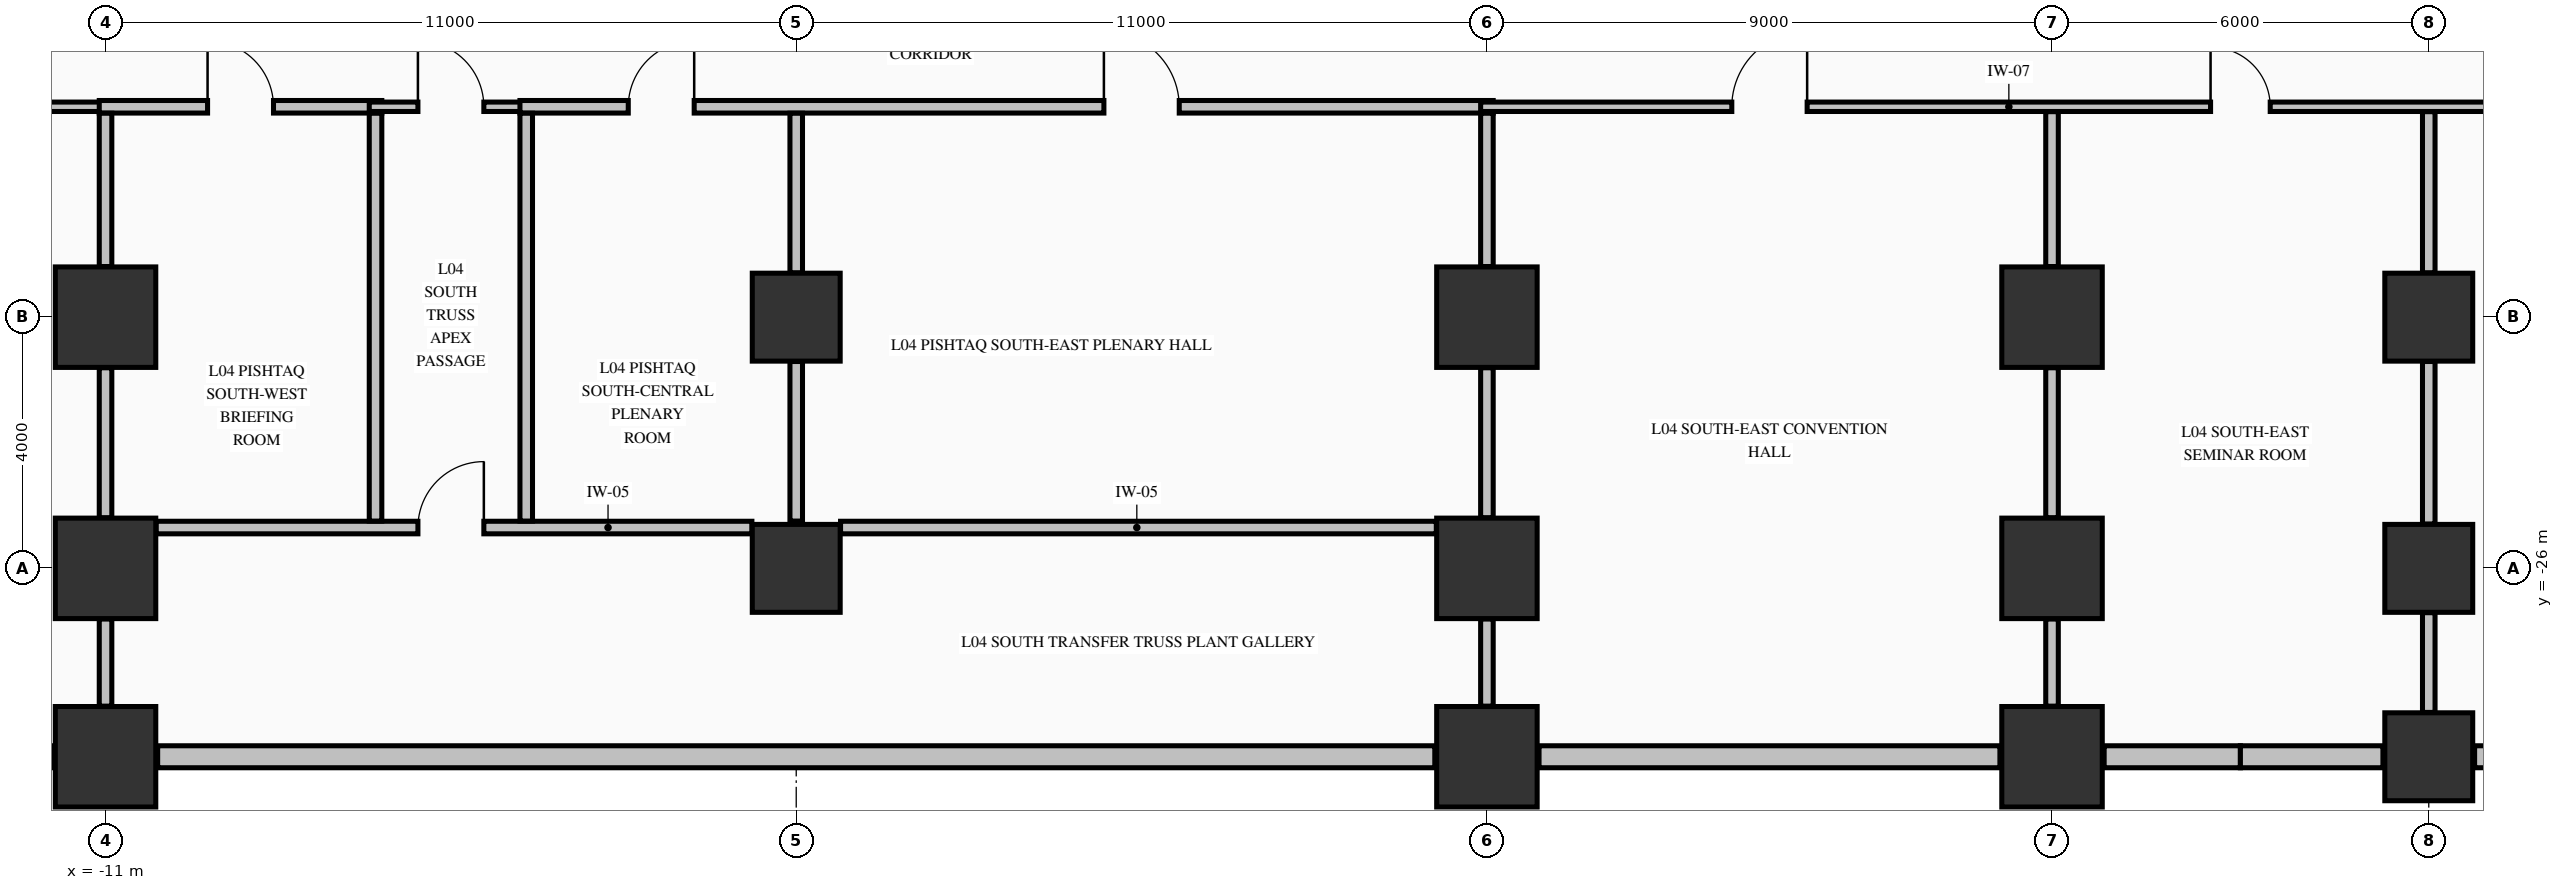
"""IFC4 building model, lengths in metres.
Left out: names, types, materials, properties, quantities, classifications, styles, units other than length and angle.
Written with IfcOpenShell. Run it as: python <this file> out.ifc"""

import sys

from ifc_helpers import new_model, si_unit, direction, frame, frame_2d, origin, origin_2d, place, context, subcontext, project, spatial, rectangle, extrude, element, fill, save


model = new_model("IFC4")
c1 = context("Model", 3, precision=1e-05, world=origin(), true_north=direction((0.0, 1.0)))
c2 = subcontext(c1, "Body", "Model", "MODEL_VIEW")
j1 = project(units=[si_unit("LENGTHUNIT", "METRE"), si_unit("PLANEANGLEUNIT", "RADIAN")], contexts=[c1])
p1 = place(None, origin())
s1 = spatial("IfcSite", under=j1, at=p1, CompositionType="ELEMENT")
p2 = place(p1, origin())
s2 = spatial("IfcBuilding", under=s1, at=p2, CompositionType="ELEMENT")
p3 = place(p2, frame((0.0, 0.0, 21.76)))
s3 = spatial("IfcBuildingStorey", under=s2, at=p3, CompositionType="ELEMENT", Elevation=21.76)
for number, where, z_axis, x_axis in (
    (1, (-11.0, -29.0, -0.45), (0.0, 0.0, 1.0), (1.0, 0.0, 0.0)),
    (2, (-11.0, -26.0, -0.45), (0.0, 0.0, 1.0), (1.0, 0.0, 0.0)),
    (3, (-11.0, -22.0, -0.45), (0.0, 0.0, 1.0), (1.0, 0.0, 0.0)),
):
    element("IfcColumn", number, at=place(p3, frame(where, z_axis=z_axis, x_axis=x_axis)), inside=s3, PredefinedType="COLUMN", context=c2, shape_type="SweptSolid", body=[
        extrude(rectangle(XDim=1.6, YDim=1.6, at=origin_2d()), origin(), (0.0, 0.0, 1.0), 5.44),
    ])
for number, where, z_axis, x_axis in (
    (4, (0.0, -26.0, -0.45), (0.0, 0.0, 1.0), (1.0, 0.0, 0.0)),
    (5, (0.0, -22.0, -0.45), (0.0, 0.0, 1.0), (1.0, 0.0, 0.0)),
):
    element("IfcColumn", number, at=place(p3, frame(where, z_axis=z_axis, x_axis=x_axis)), inside=s3, PredefinedType="COLUMN", context=c2, shape_type="SweptSolid", body=[
        extrude(rectangle(XDim=1.4, YDim=1.4, at=origin_2d()), origin(), (0.0, 0.0, 1.0), 5.44),
    ])
for number, where, z_axis, x_axis in (
    (6, (11.0, -29.0, -0.45), (0.0, 0.0, 1.0), (1.0, 0.0, 0.0)),
    (7, (11.0, -26.0, -0.45), (0.0, 0.0, 1.0), (1.0, 0.0, 0.0)),
    (8, (11.0, -22.0, -0.45), (0.0, 0.0, 1.0), (1.0, 0.0, 0.0)),
    (9, (20.0, -29.0, -0.45), (0.0, 0.0, 1.0), (1.0, 0.0, 0.0)),
    (10, (20.0, -26.0, -0.45), (0.0, 0.0, 1.0), (1.0, 0.0, 0.0)),
    (11, (20.0, -22.0, -0.45), (0.0, 0.0, 1.0), (1.0, 0.0, 0.0)),
):
    element("IfcColumn", number, at=place(p3, frame(where, z_axis=z_axis, x_axis=x_axis)), inside=s3, PredefinedType="COLUMN", context=c2, shape_type="SweptSolid", body=[
        extrude(rectangle(XDim=1.6, YDim=1.6, at=origin_2d()), origin(), (0.0, 0.0, 1.0), 5.44),
    ])
for number, where, z_axis, x_axis in (
    (12, (26.0, -29.0, -0.45), (0.0, 0.0, 1.0), (1.0, 0.0, 0.0)),
    (13, (26.0, -26.0, -0.45), (0.0, 0.0, 1.0), (1.0, 0.0, 0.0)),
    (14, (26.0, -22.0, -0.45), (0.0, 0.0, 1.0), (1.0, 0.0, 0.0)),
):
    element("IfcColumn", number, at=place(p3, frame(where, z_axis=z_axis, x_axis=x_axis)), inside=s3, PredefinedType="COLUMN", context=c2, shape_type="SweptSolid", body=[
        extrude(rectangle(XDim=1.4, YDim=1.4, at=origin_2d()), origin(), (0.0, 0.0, 1.0), 5.44),
    ])
p4 = place(p3, frame((-19.17, -29.0, 0.0), z_axis=(0.0, 0.0, 1.0), x_axis=(1.0, 0.0, 0.0)))
e15 = element("IfcWall", 15, at=p4, inside=s3, PredefinedType="STANDARD", context=c2, shape_type="SweptSolid", body=[
    extrude(rectangle(XDim=7.34, YDim=0.35, at=frame_2d((3.67, 0.0))), origin(), (0.0, 0.0, 1.0), 3.332),
])
p5 = place(p3, frame((-10.17, -29.0, 0.0), z_axis=(0.0, 0.0, 1.0), x_axis=(1.0, 0.0, 0.0)))
e16 = element("IfcWall", 16, at=p5, inside=s3, PredefinedType="STANDARD", context=c2, shape_type="SweptSolid", body=[
    extrude(rectangle(XDim=20.34, YDim=0.35, at=frame_2d((10.17, 0.0))), origin(), (0.0, 0.0, 1.0), 2.582),
])
p6 = place(p3, frame((11.83, -29.0, 0.0), z_axis=(0.0, 0.0, 1.0), x_axis=(1.0, 0.0, 0.0)))
e17 = element("IfcWall", 17, at=p6, inside=s3, PredefinedType="STANDARD", context=c2, shape_type="SweptSolid", body=[
    extrude(rectangle(XDim=7.34, YDim=0.35, at=frame_2d((3.67, 0.0))), origin(), (0.0, 0.0, 1.0), 3.332),
])
p7 = place(p3, frame((20.83, -29.0, 0.0), z_axis=(0.0, 0.0, 1.0), x_axis=(1.0, 0.0, 0.0)))
e18 = element("IfcWall", 18, at=p7, inside=s3, PredefinedType="STANDARD", context=c2, shape_type="SweptSolid", body=[
    extrude(rectangle(XDim=2.17, YDim=0.35, at=frame_2d((1.085, 0.0))), origin(), (0.0, 0.0, 1.0), 3.332),
])
p8 = place(p3, frame((23.0, -29.0, 0.0), z_axis=(0.0, 0.0, 1.0), x_axis=(1.0, 0.0, 0.0)))
e19 = element("IfcWall", 19, at=p8, inside=s3, PredefinedType="STANDARD", context=c2, shape_type="SweptSolid", body=[
    extrude(rectangle(XDim=2.27, YDim=0.35, at=frame_2d((1.135, 0.0))), origin(), (0.0, 0.0, 1.0), 3.332),
])
p9 = place(p3, frame((26.73, -29.0, 0.0), z_axis=(0.0, 0.0, 1.0), x_axis=(1.0, 0.0, 0.0)))
e20 = element("IfcWall", 20, at=p9, inside=s3, PredefinedType="STANDARD", context=c2, shape_type="SweptSolid", body=[
    extrude(rectangle(XDim=2.54, YDim=0.35, at=frame_2d((1.27, 0.0))), origin(), (0.0, 0.0, 1.0), 3.332),
])
p10 = place(p3, frame((-10.194, -25.35, 0.0), z_axis=(0.0, 0.0, 1.0), x_axis=(1.0, 0.0, 0.0)))
e21 = element("IfcWall", 21, at=p10, inside=s3, PredefinedType="PARTITIONING", context=c2, shape_type="SweptSolid", body=[
    extrude(rectangle(XDim=9.488, YDim=0.2, at=frame_2d((4.744, 0.0))), origin(), (0.0, 0.0, 1.0), 3.332),
])
p11 = place(p10, frame((4.169, 0.0, 0.0)))
e22 = element("IfcOpeningElement", 22, at=p11, cuts=e21, PredefinedType="OPENING", context=c2, shape_type="SweptSolid", body=[
    extrude(rectangle(XDim=1.05, YDim=2.15, at=frame_2d((0.525, 1.075))), frame((0.0, 0.11, 0.0), z_axis=(0.0, -1.0, 0.0), x_axis=(1.0, 0.0, 0.0)), (0.0, 0.0, 1.0), 0.22),
])
p12 = place(p3, frame((0.706, -25.35, 0.0), z_axis=(0.0, 0.0, 1.0), x_axis=(1.0, 0.0, 0.0)))
e23 = element("IfcWall", 23, at=p12, inside=s3, PredefinedType="PARTITIONING", context=c2, shape_type="SweptSolid", body=[
    extrude(rectangle(XDim=9.488, YDim=0.2, at=frame_2d((4.744, 0.0))), origin(), (0.0, 0.0, 1.0), 3.332),
])
p13 = place(p3, frame((-29.85, -18.65, 0.0), z_axis=(0.0, 0.0, 1.0), x_axis=(1.0, 0.0, 0.0)))
e24 = element("IfcWall", 24, at=p13, inside=s3, PredefinedType="PARTITIONING", context=c2, shape_type="SweptSolid", body=[
    extrude(rectangle(XDim=18.95, YDim=0.15, at=frame_2d((9.475, 0.0))), origin(), (0.0, 0.0, 1.0), 4.99),
])
p14 = place(p13, frame((1.425, 0.0, 0.0)))
e25 = element("IfcOpeningElement", 25, at=p14, cuts=e24, PredefinedType="OPENING", context=c2, shape_type="SweptSolid", body=[
    extrude(rectangle(XDim=0.95, YDim=2.15, at=frame_2d((0.475, 1.075))), frame((0.0, 0.085, 0.0), z_axis=(0.0, -1.0, 0.0), x_axis=(1.0, 0.0, 0.0)), (0.0, 0.0, 1.0), 0.17),
])
p15 = place(p13, frame((6.375, 0.0, 0.0)))
e26 = element("IfcOpeningElement", 26, at=p15, cuts=e24, PredefinedType="OPENING", context=c2, shape_type="SweptSolid", body=[
    extrude(rectangle(XDim=0.95, YDim=2.15, at=frame_2d((0.475, 1.075))), frame((0.0, 0.085, 0.0), z_axis=(0.0, -1.0, 0.0), x_axis=(1.0, 0.0, 0.0)), (0.0, 0.0, 1.0), 0.17),
])
p16 = place(p13, frame((13.75, 0.0, 0.0)))
e27 = element("IfcOpeningElement", 27, at=p16, cuts=e24, PredefinedType="OPENING", context=c2, shape_type="SweptSolid", body=[
    extrude(rectangle(XDim=1.2, YDim=2.15, at=frame_2d((0.6, 1.075))), frame((0.0, 0.085, 0.0), z_axis=(0.0, -1.0, 0.0), x_axis=(1.0, 0.0, 0.0)), (0.0, 0.0, 1.0), 0.17),
])
p17 = place(p3, frame((-11.1, -18.65, 0.0), z_axis=(0.0, 0.0, 1.0), x_axis=(1.0, 0.0, 0.0)))
e28 = element("IfcWall", 28, at=p17, inside=s3, PredefinedType="PARTITIONING", context=c2, shape_type="SweptSolid", body=[
    extrude(rectangle(XDim=4.5, YDim=0.2, at=frame_2d((2.25, 0.0))), origin(), (0.0, 0.0, 1.0), 4.99),
])
p18 = place(p17, frame((1.725, 0.0, 0.0)))
e29 = element("IfcOpeningElement", 29, at=p18, cuts=e28, PredefinedType="OPENING", context=c2, shape_type="SweptSolid", body=[
    extrude(rectangle(XDim=1.05, YDim=2.15, at=frame_2d((0.525, 1.075))), frame((0.0, 0.11, 0.0), z_axis=(0.0, -1.0, 0.0), x_axis=(1.0, 0.0, 0.0)), (0.0, 0.0, 1.0), 0.22),
])
p19 = place(p3, frame((-6.8, -18.65, 0.0), z_axis=(0.0, 0.0, 1.0), x_axis=(1.0, 0.0, 0.0)))
e30 = element("IfcWall", 30, at=p19, inside=s3, PredefinedType="PARTITIONING", context=c2, shape_type="SweptSolid", body=[
    extrude(rectangle(XDim=2.6, YDim=0.15, at=frame_2d((1.3, 0.0))), origin(), (0.0, 0.0, 1.0), 4.99),
])
p20 = place(p19, frame((0.775, 0.0, 0.0)))
e31 = element("IfcOpeningElement", 31, at=p20, cuts=e30, PredefinedType="OPENING", context=c2, shape_type="SweptSolid", body=[
    extrude(rectangle(XDim=1.05, YDim=2.15, at=frame_2d((0.525, 1.075))), frame((0.0, 0.085, 0.0), z_axis=(0.0, -1.0, 0.0), x_axis=(1.0, 0.0, 0.0)), (0.0, 0.0, 1.0), 0.17),
])
p21 = place(p3, frame((-4.4, -18.65, 0.0), z_axis=(0.0, 0.0, 1.0), x_axis=(1.0, 0.0, 0.0)))
e32 = element("IfcWall", 32, at=p21, inside=s3, PredefinedType="PARTITIONING", context=c2, shape_type="SweptSolid", body=[
    extrude(rectangle(XDim=15.5, YDim=0.2, at=frame_2d((7.75, 0.0))), origin(), (0.0, 0.0, 1.0), 4.99),
])
p22 = place(p21, frame((1.725, 0.0, 0.0)))
e33 = element("IfcOpeningElement", 33, at=p22, cuts=e32, PredefinedType="OPENING", context=c2, shape_type="SweptSolid", body=[
    extrude(rectangle(XDim=1.05, YDim=2.15, at=frame_2d((0.525, 1.075))), frame((0.0, 0.11, 0.0), z_axis=(0.0, -1.0, 0.0), x_axis=(1.0, 0.0, 0.0)), (0.0, 0.0, 1.0), 0.22),
])
p23 = place(p21, frame((9.3, 0.0, 0.0)))
e34 = element("IfcOpeningElement", 34, at=p23, cuts=e32, PredefinedType="OPENING", context=c2, shape_type="SweptSolid", body=[
    extrude(rectangle(XDim=1.2, YDim=2.15, at=frame_2d((0.6, 1.075))), frame((0.0, 0.11, 0.0), z_axis=(0.0, -1.0, 0.0), x_axis=(1.0, 0.0, 0.0)), (0.0, 0.0, 1.0), 0.22),
])
p24 = place(p3, frame((10.9, -18.65, 0.0), z_axis=(0.0, 0.0, 1.0), x_axis=(1.0, 0.0, 0.0)))
e35 = element("IfcWall", 35, at=p24, inside=s3, PredefinedType="PARTITIONING", context=c2, shape_type="SweptSolid", body=[
    extrude(rectangle(XDim=18.95, YDim=0.15, at=frame_2d((9.475, 0.0))), origin(), (0.0, 0.0, 1.0), 4.99),
])
p25 = place(p24, frame((4.0, 0.0, 0.0)))
e36 = element("IfcOpeningElement", 36, at=p25, cuts=e35, PredefinedType="OPENING", context=c2, shape_type="SweptSolid", body=[
    extrude(rectangle(XDim=1.2, YDim=2.15, at=frame_2d((0.6, 1.075))), frame((0.0, 0.085, 0.0), z_axis=(0.0, -1.0, 0.0), x_axis=(1.0, 0.0, 0.0)), (0.0, 0.0, 1.0), 0.17),
])
p26 = place(p24, frame((11.625, 0.0, 0.0)))
e37 = element("IfcOpeningElement", 37, at=p26, cuts=e35, PredefinedType="OPENING", context=c2, shape_type="SweptSolid", body=[
    extrude(rectangle(XDim=0.95, YDim=2.15, at=frame_2d((0.475, 1.075))), frame((0.0, 0.085, 0.0), z_axis=(0.0, -1.0, 0.0), x_axis=(1.0, 0.0, 0.0)), (0.0, 0.0, 1.0), 0.17),
])
p27 = place(p24, frame((16.555, 0.0, 0.0)))
e38 = element("IfcOpeningElement", 38, at=p27, cuts=e35, PredefinedType="OPENING", context=c2, shape_type="SweptSolid", body=[
    extrude(rectangle(XDim=0.95, YDim=2.15, at=frame_2d((0.475, 1.075))), frame((0.0, 0.085, 0.0), z_axis=(0.0, -1.0, 0.0), x_axis=(1.0, 0.0, 0.0)), (0.0, 0.0, 1.0), 0.17),
])
p28 = place(p3, frame((-11.0, -28.194, 0.0), z_axis=(0.0, 0.0, 1.0), x_axis=(0.0, 1.0, 0.0)))
e39 = element("IfcWall", 39, at=p28, inside=s3, PredefinedType="PARTITIONING", context=c2, shape_type="SweptSolid", body=[
    extrude(rectangle(XDim=1.388, YDim=0.2, at=frame_2d((0.694, 0.0))), origin(), (0.0, 0.0, 1.0), 3.332),
])
p29 = place(p3, frame((-11.0, -25.194, 0.0), z_axis=(0.0, 0.0, 1.0), x_axis=(0.0, 1.0, 0.0)))
e40 = element("IfcWall", 40, at=p29, inside=s3, PredefinedType="PARTITIONING", context=c2, shape_type="SweptSolid", body=[
    extrude(rectangle(XDim=2.388, YDim=0.2, at=frame_2d((1.194, 0.0))), origin(), (0.0, 0.0, 1.0), 3.332),
])
p30 = place(p3, frame((-11.0, -21.194, 0.0), z_axis=(0.0, 0.0, 1.0), x_axis=(0.0, 1.0, 0.0)))
e41 = element("IfcWall", 41, at=p30, inside=s3, PredefinedType="PARTITIONING", context=c2, shape_type="SweptSolid", body=[
    extrude(rectangle(XDim=2.441, YDim=0.2, at=frame_2d((1.221, 0.0))), origin(), (0.0, 0.0, 1.0), 3.332),
])
for number, where, z_axis, x_axis in (
    (42, (-6.7, -25.247, 0.0), (0.0, 0.0, 1.0), (0.0, 1.0, 0.0)),
    (43, (-4.3, -25.247, 0.0), (0.0, 0.0, 1.0), (0.0, 1.0, 0.0)),
):
    element("IfcWall", number, at=place(p3, frame(where, z_axis=z_axis, x_axis=x_axis)), inside=s3, PredefinedType="PARTITIONING", context=c2, shape_type="SweptSolid", body=[
        extrude(rectangle(XDim=6.494, YDim=0.2, at=frame_2d((3.247, 0.0))), origin(), (0.0, 0.0, 1.0), 4.99),
    ])
for number, where, z_axis, x_axis in (
    (44, (0.0, -25.247, 0.0), (0.0, 0.0, 1.0), (0.0, 1.0, 0.0)),
    (45, (0.0, -21.294, 0.0), (0.0, 0.0, 1.0), (0.0, 1.0, 0.0)),
):
    element("IfcWall", number, at=place(p3, frame(where, z_axis=z_axis, x_axis=x_axis)), inside=s3, PredefinedType="PARTITIONING", context=c2, shape_type="SweptSolid", body=[
        extrude(rectangle(XDim=2.541, YDim=0.2, at=frame_2d((1.271, 0.0))), origin(), (0.0, 0.0, 1.0), 3.332),
    ])
p31 = place(p3, frame((11.0, -28.194, 0.0), z_axis=(0.0, 0.0, 1.0), x_axis=(0.0, 1.0, 0.0)))
e46 = element("IfcWall", 46, at=p31, inside=s3, PredefinedType="PARTITIONING", context=c2, shape_type="SweptSolid", body=[
    extrude(rectangle(XDim=1.388, YDim=0.2, at=frame_2d((0.694, 0.0))), origin(), (0.0, 0.0, 1.0), 3.332),
])
p32 = place(p3, frame((11.0, -25.194, 0.0), z_axis=(0.0, 0.0, 1.0), x_axis=(0.0, 1.0, 0.0)))
e47 = element("IfcWall", 47, at=p32, inside=s3, PredefinedType="PARTITIONING", context=c2, shape_type="SweptSolid", body=[
    extrude(rectangle(XDim=2.388, YDim=0.2, at=frame_2d((1.194, 0.0))), origin(), (0.0, 0.0, 1.0), 3.332),
])
p33 = place(p3, frame((11.0, -21.194, 0.0), z_axis=(0.0, 0.0, 1.0), x_axis=(0.0, 1.0, 0.0)))
e48 = element("IfcWall", 48, at=p33, inside=s3, PredefinedType="PARTITIONING", context=c2, shape_type="SweptSolid", body=[
    extrude(rectangle(XDim=2.441, YDim=0.2, at=frame_2d((1.221, 0.0))), origin(), (0.0, 0.0, 1.0), 3.332),
])
p34 = place(p3, frame((20.0, -28.194, 0.0), z_axis=(0.0, 0.0, 1.0), x_axis=(0.0, 1.0, 0.0)))
e49 = element("IfcWall", 49, at=p34, inside=s3, PredefinedType="PARTITIONING", context=c2, shape_type="SweptSolid", body=[
    extrude(rectangle(XDim=1.388, YDim=0.2, at=frame_2d((0.694, 0.0))), origin(), (0.0, 0.0, 1.0), 3.332),
])
p35 = place(p3, frame((20.0, -25.194, 0.0), z_axis=(0.0, 0.0, 1.0), x_axis=(0.0, 1.0, 0.0)))
e50 = element("IfcWall", 50, at=p35, inside=s3, PredefinedType="PARTITIONING", context=c2, shape_type="SweptSolid", body=[
    extrude(rectangle(XDim=2.388, YDim=0.2, at=frame_2d((1.194, 0.0))), origin(), (0.0, 0.0, 1.0), 3.332),
])
p36 = place(p3, frame((20.0, -21.194, 0.0), z_axis=(0.0, 0.0, 1.0), x_axis=(0.0, 1.0, 0.0)))
e51 = element("IfcWall", 51, at=p36, inside=s3, PredefinedType="PARTITIONING", context=c2, shape_type="SweptSolid", body=[
    extrude(rectangle(XDim=2.466, YDim=0.2, at=frame_2d((1.233, 0.0))), origin(), (0.0, 0.0, 1.0), 3.332),
])
p37 = place(p3, frame((26.0, -28.294, 0.0), z_axis=(0.0, 0.0, 1.0), x_axis=(0.0, 1.0, 0.0)))
e52 = element("IfcWall", 52, at=p37, inside=s3, PredefinedType="PARTITIONING", context=c2, shape_type="SweptSolid", body=[
    extrude(rectangle(XDim=1.588, YDim=0.2, at=frame_2d((0.794, 0.0))), origin(), (0.0, 0.0, 1.0), 3.332),
])
p38 = place(p3, frame((26.0, -25.294, 0.0), z_axis=(0.0, 0.0, 1.0), x_axis=(0.0, 1.0, 0.0)))
e53 = element("IfcWall", 53, at=p38, inside=s3, PredefinedType="PARTITIONING", context=c2, shape_type="SweptSolid", body=[
    extrude(rectangle(XDim=2.588, YDim=0.2, at=frame_2d((1.294, 0.0))), origin(), (0.0, 0.0, 1.0), 3.332),
])
p39 = place(p3, frame((26.0, -21.294, 0.0), z_axis=(0.0, 0.0, 1.0), x_axis=(0.0, 1.0, 0.0)))
e54 = element("IfcWall", 54, at=p39, inside=s3, PredefinedType="PARTITIONING", context=c2, shape_type="SweptSolid", body=[
    extrude(rectangle(XDim=2.566, YDim=0.2, at=frame_2d((1.283, 0.0))), origin(), (0.0, 0.0, 1.0), 3.332),
])
p40 = place(p25, origin())
e55 = element("IfcDoor", 55, at=p40, inside=s3, OperationType="SINGLE_SWING_RIGHT", PredefinedType="DOOR", context=c2, shape_type="SweptSolid", body=[
    extrude(rectangle(XDim=1.2, YDim=2.15, at=frame_2d((0.6, 1.075))), frame((0.0, 0.025, 0.0), z_axis=(0.0, -1.0, 0.0), x_axis=(1.0, 0.0, 0.0)), (0.0, 0.0, 1.0), 0.05),
])
fill(e36, e55)
p41 = place(p26, origin())
e56 = element("IfcDoor", 56, at=p41, inside=s3, OperationType="SINGLE_SWING_LEFT", PredefinedType="DOOR", context=c2, shape_type="SweptSolid", body=[
    extrude(rectangle(XDim=0.95, YDim=2.15, at=frame_2d((0.475, 1.075))), frame((0.0, 0.025, 0.0), z_axis=(0.0, -1.0, 0.0), x_axis=(1.0, 0.0, 0.0)), (0.0, 0.0, 1.0), 0.05),
])
fill(e37, e56)
p42 = place(p20, origin())
e57 = element("IfcDoor", 57, at=p42, inside=s3, OperationType="SINGLE_SWING_LEFT", PredefinedType="DOOR", context=c2, shape_type="SweptSolid", body=[
    extrude(rectangle(XDim=1.05, YDim=2.15, at=frame_2d((0.525, 1.075))), frame((0.0, 0.025, 0.0), z_axis=(0.0, -1.0, 0.0), x_axis=(1.0, 0.0, 0.0)), (0.0, 0.0, 1.0), 0.05),
])
fill(e31, e57)
p43 = place(p11, origin())
e58 = element("IfcDoor", 58, at=p43, inside=s3, OperationType="SINGLE_SWING_RIGHT", PredefinedType="DOOR", context=c2, shape_type="SweptSolid", body=[
    extrude(rectangle(XDim=1.05, YDim=2.15, at=frame_2d((0.525, 1.075))), frame((0.0, 0.025, 0.0), z_axis=(0.0, -1.0, 0.0), x_axis=(1.0, 0.0, 0.0)), (0.0, 0.0, 1.0), 0.05),
])
fill(e22, e58)
p44 = place(p18, origin())
e59 = element("IfcDoor", 59, at=p44, inside=s3, OperationType="SINGLE_SWING_LEFT", PredefinedType="DOOR", context=c2, shape_type="SweptSolid", body=[
    extrude(rectangle(XDim=1.05, YDim=2.15, at=frame_2d((0.525, 1.075))), frame((0.0, 0.025, 0.0), z_axis=(0.0, -1.0, 0.0), x_axis=(1.0, 0.0, 0.0)), (0.0, 0.0, 1.0), 0.05),
])
fill(e29, e59)
p45 = place(p22, origin())
e60 = element("IfcDoor", 60, at=p45, inside=s3, OperationType="SINGLE_SWING_RIGHT", PredefinedType="DOOR", context=c2, shape_type="SweptSolid", body=[
    extrude(rectangle(XDim=1.05, YDim=2.15, at=frame_2d((0.525, 1.075))), frame((0.0, 0.025, 0.0), z_axis=(0.0, -1.0, 0.0), x_axis=(1.0, 0.0, 0.0)), (0.0, 0.0, 1.0), 0.05),
])
fill(e33, e60)
p46 = place(p23, origin())
e61 = element("IfcDoor", 61, at=p46, inside=s3, OperationType="SINGLE_SWING_LEFT", PredefinedType="DOOR", context=c2, shape_type="SweptSolid", body=[
    extrude(rectangle(XDim=1.2, YDim=2.15, at=frame_2d((0.6, 1.075))), frame((0.0, 0.025, 0.0), z_axis=(0.0, -1.0, 0.0), x_axis=(1.0, 0.0, 0.0)), (0.0, 0.0, 1.0), 0.05),
])
fill(e34, e61)
save(model, sys.argv[1])
